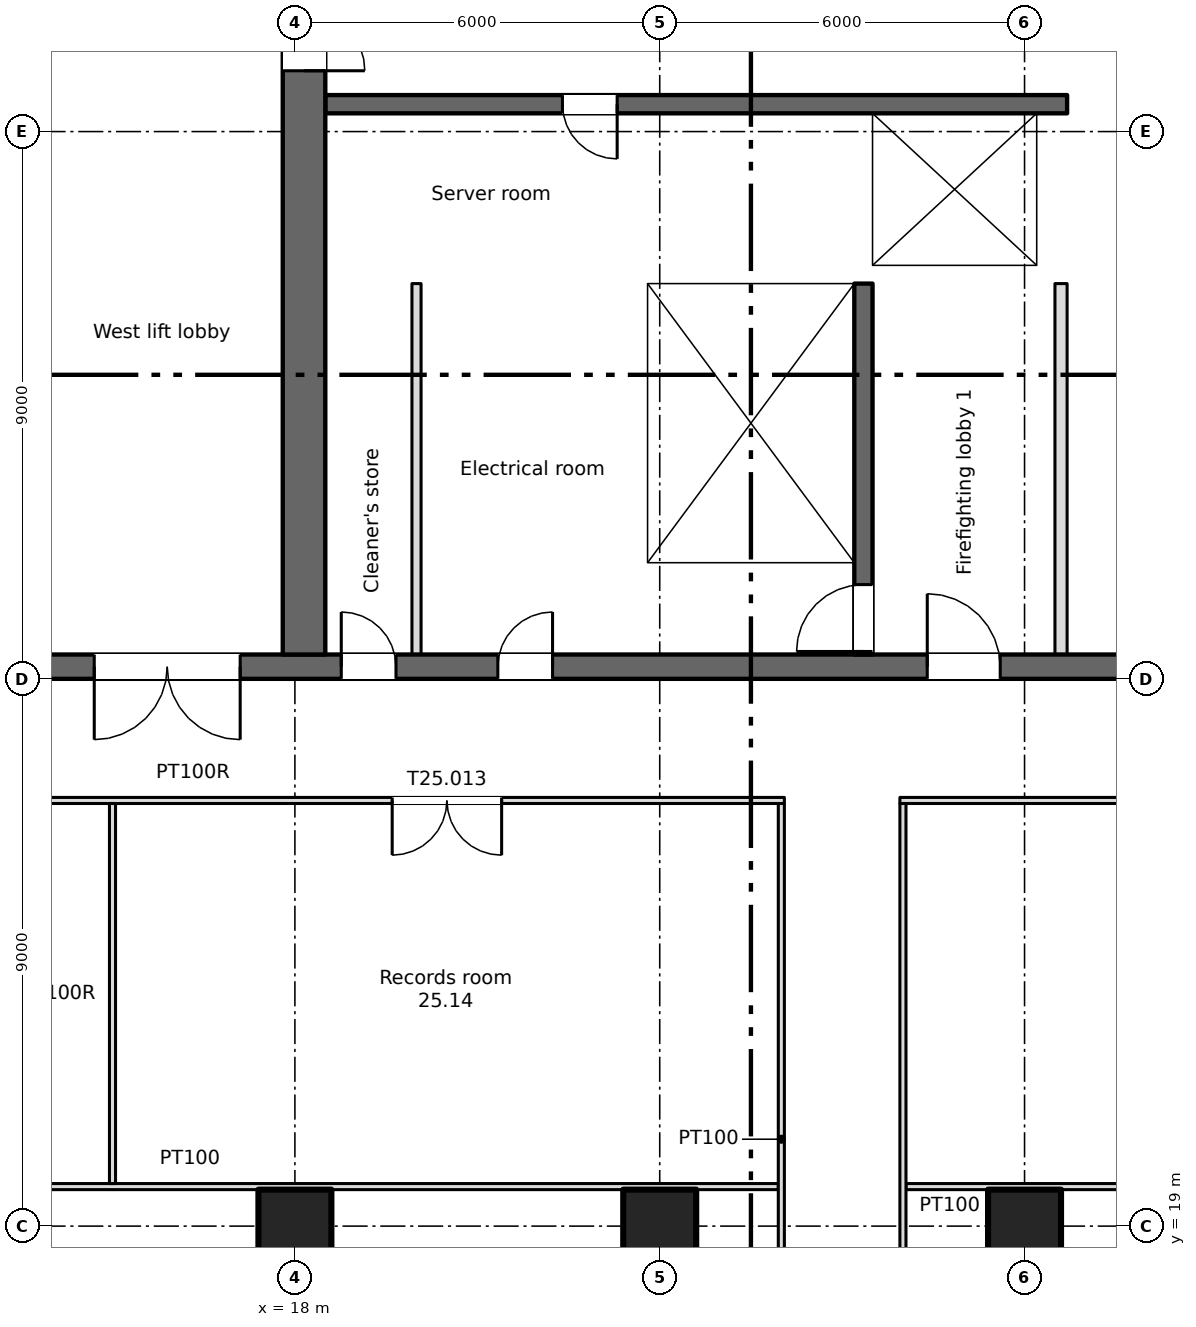
"""IFC4 building model, lengths in metres.
Left out: names, types, materials, properties, quantities, classifications, styles, units other than length and angle.
Written with IfcOpenShell. Run it as: python <this file> out.ifc"""

import sys

from ifc_helpers import new_model, si_unit, direction, frame, frame_2d, origin, origin_2d, place, context, subcontext, project, spatial, rectangle, extrude, element, fill, save


model = new_model("IFC4")
c1 = context("Model", 3, precision=1e-05, world=origin(), true_north=direction((0.0, 1.0)))
c2 = subcontext(c1, "Body", "Model", "MODEL_VIEW")
j1 = project(units=[si_unit("LENGTHUNIT", "METRE"), si_unit("PLANEANGLEUNIT", "RADIAN")], contexts=[c1])
p1 = place(None, origin())
s1 = spatial("IfcSite", under=j1, at=p1, CompositionType="ELEMENT")
p2 = place(p1, origin())
s2 = spatial("IfcBuilding", under=s1, at=p2, CompositionType="ELEMENT")
p3 = place(p2, frame((0.0, 0.0, 170.5)))
s3 = spatial("IfcBuildingStorey", under=s2, at=p3, CompositionType="ELEMENT", Elevation=170.5)
for number, where, z_axis, x_axis in (
    (1, (18.0, 19.0, 0.0), (0.0, 0.0, 1.0), (1.0, 0.0, 0.0)),
    (2, (24.0, 19.0, 0.0), (0.0, 0.0, 1.0), (1.0, 0.0, 0.0)),
    (3, (30.0, 19.0, 0.0), (0.0, 0.0, 1.0), (1.0, 0.0, 0.0)),
):
    element("IfcColumn", number, at=place(p3, frame(where, z_axis=z_axis, x_axis=x_axis)), inside=s3, PredefinedType="COLUMN", context=c2, shape_type="SweptSolid", body=[
        extrude(rectangle(XDim=1.2, YDim=1.2, at=origin_2d()), origin(), (0.0, 0.0, 1.0), 3.35),
    ])
p4 = place(p3, frame((6.6, 28.2, 0.0), z_axis=(0.0, 0.0, 1.0), x_axis=(1.0, 0.0, 0.0)))
e4 = element("IfcWall", 4, at=p4, inside=s3, PredefinedType="SHEAR", context=c2, shape_type="SweptSolid", body=[
    extrude(rectangle(XDim=57.9, YDim=0.4, at=frame_2d((28.95, 0.0))), origin(), (0.0, 0.0, 1.0), 3.35),
])
p5 = place(p4, frame((12.163, 0.0, 0.0)))
e5 = element("IfcOpeningElement", 5, at=p5, cuts=e4, PredefinedType="OPENING", context=c2, shape_type="SweptSolid", body=[
    extrude(rectangle(XDim=0.9, YDim=2.1, at=frame_2d((0.45, 1.05))), frame((0.0, 0.21, 0.0), z_axis=(0.0, -1.0, 0.0), x_axis=(1.0, 0.0, 0.0)), (0.0, 0.0, 1.0), 0.42),
])
p6 = place(p4, frame((14.738, 0.0, 0.0)))
e6 = element("IfcOpeningElement", 6, at=p6, cuts=e4, PredefinedType="OPENING", context=c2, shape_type="SweptSolid", body=[
    extrude(rectangle(XDim=0.9, YDim=2.1, at=frame_2d((0.45, 1.05))), frame((0.0, 0.21, 0.0), z_axis=(0.0, -1.0, 0.0), x_axis=(1.0, 0.0, 0.0)), (0.0, 0.0, 1.0), 0.42),
])
p7 = place(p4, frame((49.163, 0.0, 0.0)))
e7 = element("IfcOpeningElement", 7, at=p7, cuts=e4, PredefinedType="OPENING", context=c2, shape_type="SweptSolid", body=[
    extrude(rectangle(XDim=0.9, YDim=2.1, at=frame_2d((0.45, 1.05))), frame((0.0, 0.21, 0.0), z_axis=(0.0, -1.0, 0.0), x_axis=(1.0, 0.0, 0.0)), (0.0, 0.0, 1.0), 0.42),
])
p8 = place(p4, frame((51.738, 0.0, 0.0)))
e8 = element("IfcOpeningElement", 8, at=p8, cuts=e4, PredefinedType="OPENING", context=c2, shape_type="SweptSolid", body=[
    extrude(rectangle(XDim=0.9, YDim=2.1, at=frame_2d((0.45, 1.05))), frame((0.0, 0.21, 0.0), z_axis=(0.0, -1.0, 0.0), x_axis=(1.0, 0.0, 0.0)), (0.0, 0.0, 1.0), 0.42),
])
p9 = place(p4, frame((1.45, 0.0, 0.0)))
e9 = element("IfcOpeningElement", 9, at=p9, cuts=e4, PredefinedType="OPENING", context=c2, shape_type="SweptSolid", body=[
    extrude(rectangle(XDim=0.9, YDim=2.1, at=frame_2d((0.45, 1.05))), frame((0.0, 0.21, 0.0), z_axis=(0.0, -1.0, 0.0), x_axis=(1.0, 0.0, 0.0)), (0.0, 0.0, 1.0), 0.42),
])
p10 = place(p4, frame((4.8, 0.0, 0.0)))
e10 = element("IfcOpeningElement", 10, at=p10, cuts=e4, PredefinedType="OPENING", context=c2, shape_type="SweptSolid", body=[
    extrude(rectangle(XDim=1.2, YDim=2.1, at=frame_2d((0.6, 1.05))), frame((0.0, 0.21, 0.0), z_axis=(0.0, -1.0, 0.0), x_axis=(1.0, 0.0, 0.0)), (0.0, 0.0, 1.0), 0.42),
])
p11 = place(p4, frame((31.8, 0.0, 0.0)))
e11 = element("IfcOpeningElement", 11, at=p11, cuts=e4, PredefinedType="OPENING", context=c2, shape_type="SweptSolid", body=[
    extrude(rectangle(XDim=1.2, YDim=2.1, at=frame_2d((0.6, 1.05))), frame((0.0, 0.21, 0.0), z_axis=(0.0, -1.0, 0.0), x_axis=(1.0, 0.0, 0.0)), (0.0, 0.0, 1.0), 0.42),
])
p12 = place(p4, frame((55.3, 0.0, 0.0)))
e12 = element("IfcOpeningElement", 12, at=p12, cuts=e4, PredefinedType="OPENING", context=c2, shape_type="SweptSolid", body=[
    extrude(rectangle(XDim=1.2, YDim=2.1, at=frame_2d((0.6, 1.05))), frame((0.0, 0.21, 0.0), z_axis=(0.0, -1.0, 0.0), x_axis=(1.0, 0.0, 0.0)), (0.0, 0.0, 1.0), 0.42),
])
p13 = place(p4, frame((21.8, 0.0, 0.0)))
e13 = element("IfcOpeningElement", 13, at=p13, cuts=e4, PredefinedType="OPENING", context=c2, shape_type="SweptSolid", body=[
    extrude(rectangle(XDim=1.2, YDim=2.1, at=frame_2d((0.6, 1.05))), frame((0.0, 0.21, 0.0), z_axis=(0.0, -1.0, 0.0), x_axis=(1.0, 0.0, 0.0)), (0.0, 0.0, 1.0), 0.42),
])
p14 = place(p4, frame((41.8, 0.0, 0.0)))
e14 = element("IfcOpeningElement", 14, at=p14, cuts=e4, PredefinedType="OPENING", context=c2, shape_type="SweptSolid", body=[
    extrude(rectangle(XDim=1.2, YDim=2.1, at=frame_2d((0.6, 1.05))), frame((0.0, 0.21, 0.0), z_axis=(0.0, -1.0, 0.0), x_axis=(1.0, 0.0, 0.0)), (0.0, 0.0, 1.0), 0.42),
])
p15 = place(p4, frame((24.95, 0.0, 0.0)))
e15 = element("IfcOpeningElement", 15, at=p15, cuts=e4, PredefinedType="OPENING", context=c2, shape_type="SweptSolid", body=[
    extrude(rectangle(XDim=2.4, YDim=2.1, at=frame_2d((1.2, 1.05))), frame((0.0, 0.21, 0.0), z_axis=(0.0, -1.0, 0.0), x_axis=(1.0, 0.0, 0.0)), (0.0, 0.0, 1.0), 0.42),
])
p16 = place(p4, frame((37.45, 0.0, 0.0)))
e16 = element("IfcOpeningElement", 16, at=p16, cuts=e4, PredefinedType="OPENING", context=c2, shape_type="SweptSolid", body=[
    extrude(rectangle(XDim=2.4, YDim=2.1, at=frame_2d((1.2, 1.05))), frame((0.0, 0.21, 0.0), z_axis=(0.0, -1.0, 0.0), x_axis=(1.0, 0.0, 0.0)), (0.0, 0.0, 1.0), 0.42),
])
p17 = place(p4, frame((8.1, 0.0, 0.0)))
e17 = element("IfcOpeningElement", 17, at=p17, cuts=e4, PredefinedType="OPENING", context=c2, shape_type="SweptSolid", body=[
    extrude(rectangle(XDim=2.4, YDim=2.1, at=frame_2d((1.2, 1.05))), frame((0.0, 0.21, 0.0), z_axis=(0.0, -1.0, 0.0), x_axis=(1.0, 0.0, 0.0)), (0.0, 0.0, 1.0), 0.42),
])
p18 = place(p4, frame((28.95, 0.0, 0.0)))
e18 = element("IfcOpeningElement", 18, at=p18, cuts=e4, PredefinedType="OPENING", context=c2, shape_type="SweptSolid", body=[
    extrude(rectangle(XDim=0.9, YDim=2.1, at=frame_2d((0.45, 1.05))), frame((0.0, 0.21, 0.0), z_axis=(0.0, -1.0, 0.0), x_axis=(1.0, 0.0, 0.0)), (0.0, 0.0, 1.0), 0.42),
])
p19 = place(p4, frame((34.95, 0.0, 0.0)))
e19 = element("IfcOpeningElement", 19, at=p19, cuts=e4, PredefinedType="OPENING", context=c2, shape_type="SweptSolid", body=[
    extrude(rectangle(XDim=0.9, YDim=2.1, at=frame_2d((0.45, 1.05))), frame((0.0, 0.21, 0.0), z_axis=(0.0, -1.0, 0.0), x_axis=(1.0, 0.0, 0.0)), (0.0, 0.0, 1.0), 0.42),
])
p20 = place(p3, frame((18.15, 28.4, 0.0), z_axis=(0.0, 0.0, 1.0), x_axis=(0.0, 1.0, 0.0)))
e20 = element("IfcWall", 20, at=p20, inside=s3, PredefinedType="SHEAR", context=c2, shape_type="SweptSolid", body=[
    extrude(rectangle(XDim=16.9, YDim=0.7, at=frame_2d((8.45, 0.0))), origin(), (0.0, 0.0, 1.0), 3.35),
])
p21 = place(p20, frame((9.6, 0.0, 0.0)))
e21 = element("IfcOpeningElement", 21, at=p21, cuts=e20, PredefinedType="OPENING", context=c2, shape_type="SweptSolid", body=[
    extrude(rectangle(XDim=2.0, YDim=2.1, at=frame_2d((1.0, 1.05))), frame((0.0, 0.36, 0.0), z_axis=(0.0, -1.0, 0.0), x_axis=(1.0, 0.0, 0.0)), (0.0, 0.0, 1.0), 0.72),
])
p22 = place(p20, frame((15.4, 0.0, 0.0)))
e22 = element("IfcOpeningElement", 22, at=p22, cuts=e20, PredefinedType="OPENING", context=c2, shape_type="SweptSolid", body=[
    extrude(rectangle(XDim=1.2, YDim=2.1, at=frame_2d((0.6, 1.05))), frame((0.0, 0.36, 0.0), z_axis=(0.0, -1.0, 0.0), x_axis=(1.0, 0.0, 0.0)), (0.0, 0.0, 1.0), 0.72),
])
for number, where, z_axis, x_axis in (
    (23, (13.85, 28.4, 0.0), (0.0, 0.0, 1.0), (0.0, 1.0, 0.0)),
    (24, (23.65, 28.4, 0.0), (0.0, 0.0, 1.0), (0.0, 1.0, 0.0)),
):
    element("IfcWall", number, at=place(p3, frame(where, z_axis=z_axis, x_axis=x_axis)), inside=s3, PredefinedType="SHEAR", context=c2, shape_type="SweptSolid", body=[
        extrude(rectangle(XDim=6.1, YDim=0.3, at=frame_2d((3.05, 0.0))), origin(), (0.0, 0.0, 1.0), 3.35),
    ])
p23 = place(p3, frame((27.35, 28.4, 0.0), z_axis=(0.0, 0.0, 1.0), x_axis=(0.0, 1.0, 0.0)))
e25 = element("IfcWall", 25, at=p23, inside=s3, PredefinedType="SHEAR", context=c2, shape_type="SweptSolid", body=[
    extrude(rectangle(XDim=6.1, YDim=0.3, at=frame_2d((3.05, 0.0))), origin(), (0.0, 0.0, 1.0), 3.35),
])
p24 = place(p23, frame((0.05, 0.0, 0.0)))
e26 = element("IfcOpeningElement", 26, at=p24, cuts=e25, PredefinedType="OPENING", context=c2, shape_type="SweptSolid", body=[
    extrude(rectangle(XDim=1.1, YDim=2.1, at=frame_2d((0.55, 1.05))), frame((0.0, 0.16, 0.0), z_axis=(0.0, -1.0, 0.0), x_axis=(1.0, 0.0, 0.0)), (0.0, 0.0, 1.0), 0.32),
])
p25 = place(p3, frame((18.5, 34.65, 0.0), z_axis=(0.0, 0.0, 1.0), x_axis=(1.0, 0.0, 0.0)))
e27 = element("IfcWall", 27, at=p25, inside=s3, PredefinedType="SHEAR", context=c2, shape_type="SweptSolid", body=[
    extrude(rectangle(XDim=12.2, YDim=0.3, at=frame_2d((6.1, 0.0))), origin(), (0.0, 0.0, 1.0), 3.35),
])
p26 = place(p25, frame((9.8, 0.0, 0.0)))
e28 = element("IfcOpeningElement", 28, at=p26, cuts=e27, PredefinedType="OPENING", context=c2, shape_type="SweptSolid", body=[
    extrude(rectangle(XDim=1.1, YDim=2.1, at=frame_2d((0.55, 1.05))), frame((0.0, 0.16, 0.0), z_axis=(0.0, -1.0, 0.0), x_axis=(1.0, 0.0, 0.0)), (0.0, 0.0, 1.0), 0.32),
])
p27 = place(p3, frame((30.7, 37.45, 0.0), z_axis=(0.0, 0.0, 1.0), x_axis=(-1.0, 0.0, 0.0)))
e29 = element("IfcWall", 29, at=p27, inside=s3, PredefinedType="SHEAR", context=c2, shape_type="SweptSolid", body=[
    extrude(rectangle(XDim=12.2, YDim=0.3, at=frame_2d((6.1, 0.0))), origin(), (0.0, 0.0, 1.0), 3.35),
])
p28 = place(p27, frame((7.4, 0.0, 0.0)))
e30 = element("IfcOpeningElement", 30, at=p28, cuts=e29, PredefinedType="OPENING", context=c2, shape_type="SweptSolid", body=[
    extrude(rectangle(XDim=0.9, YDim=2.1, at=frame_2d((0.45, 1.05))), frame((0.0, 0.16, 0.0), z_axis=(0.0, -1.0, 0.0), x_axis=(1.0, 0.0, 0.0)), (0.0, 0.0, 1.0), 0.32),
])
p29 = place(p3, frame((27.35, 34.8, 0.0), z_axis=(0.0, 0.0, 1.0), x_axis=(0.0, 1.0, 0.0)))
e31 = element("IfcWall", 31, at=p29, inside=s3, PredefinedType="SHEAR", context=c2, shape_type="SweptSolid", body=[
    extrude(rectangle(XDim=2.5, YDim=0.3, at=frame_2d((1.25, 0.0))), origin(), (0.0, 0.0, 1.0), 3.35),
])
p30 = place(p3, frame((30.45, 34.8, 0.0), z_axis=(0.0, 0.0, 1.0), x_axis=(0.0, 1.0, 0.0)))
e32 = element("IfcWall", 32, at=p30, inside=s3, PredefinedType="SHEAR", context=c2, shape_type="SweptSolid", body=[
    extrude(rectangle(XDim=2.5, YDim=0.5, at=frame_2d((1.25, 0.0))), origin(), (0.0, 0.0, 1.0), 3.35),
])
p31 = place(p3, frame((13.85, 34.8, 0.0), z_axis=(0.0, 0.0, 1.0), x_axis=(0.0, 1.0, 0.0)))
e33 = element("IfcWall", 33, at=p31, inside=s3, PredefinedType="SHEAR", context=c2, shape_type="SweptSolid", body=[
    extrude(rectangle(XDim=2.5, YDim=0.3, at=frame_2d((1.25, 0.0))), origin(), (0.0, 0.0, 1.0), 3.35),
])
p32 = place(p3, frame((30.6, 28.4, 0.0), z_axis=(0.0, 0.0, 1.0), x_axis=(0.0, 1.0, 0.0)))
e34 = element("IfcWall", 34, at=p32, inside=s3, PredefinedType="PARTITIONING", context=c2, shape_type="SweptSolid", body=[
    extrude(rectangle(XDim=6.1, YDim=0.2, at=frame_2d((3.05, 0.0))), origin(), (0.0, 0.0, 1.0), 3.35),
])
p33 = place(p3, frame((20.0, 28.4, 0.0), z_axis=(0.0, 0.0, 1.0), x_axis=(0.0, 1.0, 0.0)))
e35 = element("IfcWall", 35, at=p33, inside=s3, PredefinedType="PARTITIONING", context=c2, shape_type="SweptSolid", body=[
    extrude(rectangle(XDim=6.1, YDim=0.15, at=frame_2d((3.05, 0.0))), origin(), (0.0, 0.0, 1.0), 3.35),
])
p34 = place(p3, frame((6.6, 19.65, 0.0), z_axis=(0.0, 0.0, 1.0), x_axis=(1.0, 0.0, 0.0)))
e36 = element("IfcWall", 36, at=p34, inside=s3, PredefinedType="PARTITIONING", context=c2, shape_type="SweptSolid", body=[
    extrude(rectangle(XDim=19.35, YDim=0.1, at=frame_2d((9.675, 0.0))), origin(), (0.0, 0.0, 1.0), 3.35),
])
p35 = place(p3, frame((28.05, 19.65, 0.0), z_axis=(0.0, 0.0, 1.0), x_axis=(1.0, 0.0, 0.0)))
e37 = element("IfcWall", 37, at=p35, inside=s3, PredefinedType="PARTITIONING", context=c2, shape_type="SweptSolid", body=[
    extrude(rectangle(XDim=21.9, YDim=0.1, at=frame_2d((10.95, 0.0))), origin(), (0.0, 0.0, 1.0), 3.35),
])
p36 = place(p3, frame((6.6, 26.0, 0.0), z_axis=(0.0, 0.0, 1.0), x_axis=(1.0, 0.0, 0.0)))
e38 = element("IfcWall", 38, at=p36, inside=s3, PredefinedType="PARTITIONING", context=c2, shape_type="SweptSolid", body=[
    extrude(rectangle(XDim=19.45, YDim=0.1, at=frame_2d((9.725, 0.0))), origin(), (0.0, 0.0, 1.0), 3.35),
])
p37 = place(p36, frame((3.7, 0.0, 0.0)))
e39 = element("IfcOpeningElement", 39, at=p37, cuts=e38, PredefinedType="OPENING", context=c2, shape_type="SweptSolid", body=[
    extrude(rectangle(XDim=1.0, YDim=2.1, at=frame_2d((0.5, 1.05))), frame((0.0, 0.06, 0.0), z_axis=(0.0, -1.0, 0.0), x_axis=(1.0, 0.0, 0.0)), (0.0, 0.0, 1.0), 0.12),
])
p38 = place(p36, frame((13.0, 0.0, 0.0)))
e40 = element("IfcOpeningElement", 40, at=p38, cuts=e38, PredefinedType="OPENING", context=c2, shape_type="SweptSolid", body=[
    extrude(rectangle(XDim=1.8, YDim=2.1, at=frame_2d((0.9, 1.05))), frame((0.0, 0.06, 0.0), z_axis=(0.0, -1.0, 0.0), x_axis=(1.0, 0.0, 0.0)), (0.0, 0.0, 1.0), 0.12),
])
p39 = place(p3, frame((27.95, 26.0, 0.0), z_axis=(0.0, 0.0, 1.0), x_axis=(1.0, 0.0, 0.0)))
e41 = element("IfcWall", 41, at=p39, inside=s3, PredefinedType="PARTITIONING", context=c2, shape_type="SweptSolid", body=[
    extrude(rectangle(XDim=22.1, YDim=0.1, at=frame_2d((11.05, 0.0))), origin(), (0.0, 0.0, 1.0), 3.35),
])
p40 = place(p39, frame((10.15, 0.0, 0.0)))
e42 = element("IfcOpeningElement", 42, at=p40, cuts=e41, PredefinedType="OPENING", context=c2, shape_type="SweptSolid", body=[
    extrude(rectangle(XDim=1.8, YDim=2.1, at=frame_2d((0.9, 1.05))), frame((0.0, 0.06, 0.0), z_axis=(0.0, -1.0, 0.0), x_axis=(1.0, 0.0, 0.0)), (0.0, 0.0, 1.0), 0.12),
])
p41 = place(p3, frame((15.0, 19.7, 0.0), z_axis=(0.0, 0.0, 1.0), x_axis=(0.0, 1.0, 0.0)))
e43 = element("IfcWall", 43, at=p41, inside=s3, PredefinedType="PARTITIONING", context=c2, shape_type="SweptSolid", body=[
    extrude(rectangle(XDim=6.25, YDim=0.1, at=frame_2d((3.125, 0.0))), origin(), (0.0, 0.0, 1.0), 3.35),
])
for number, where, z_axis, x_axis in (
    (44, (26.0, 12.7, 0.0), (0.0, 0.0, 1.0), (0.0, 1.0, 0.0)),
    (45, (28.0, 12.7, 0.0), (0.0, 0.0, 1.0), (0.0, 1.0, 0.0)),
):
    element("IfcWall", number, at=place(p3, frame(where, z_axis=z_axis, x_axis=x_axis)), inside=s3, PredefinedType="PARTITIONING", context=c2, shape_type="SweptSolid", body=[
        extrude(rectangle(XDim=13.25, YDim=0.1, at=frame_2d((6.625, 0.0))), origin(), (0.0, 0.0, 1.0), 3.35),
    ])
p42 = place(p5, origin())
e46 = element("IfcDoor", 46, at=p42, inside=s3, OperationType="SINGLE_SWING_LEFT", PredefinedType="DOOR", context=c2, shape_type="SweptSolid", body=[
    extrude(rectangle(XDim=0.9, YDim=2.1, at=frame_2d((0.45, 1.05))), frame((0.0, 0.025, 0.0), z_axis=(0.0, -1.0, 0.0), x_axis=(1.0, 0.0, 0.0)), (0.0, 0.0, 1.0), 0.05),
])
fill(e5, e46)
p43 = place(p6, origin())
e47 = element("IfcDoor", 47, at=p43, inside=s3, OperationType="SINGLE_SWING_RIGHT", PredefinedType="DOOR", context=c2, shape_type="SweptSolid", body=[
    extrude(rectangle(XDim=0.9, YDim=2.1, at=frame_2d((0.45, 1.05))), frame((0.0, 0.025, 0.0), z_axis=(0.0, -1.0, 0.0), x_axis=(1.0, 0.0, 0.0)), (0.0, 0.0, 1.0), 0.05),
])
fill(e6, e47)
p44 = place(p28, origin())
e48 = element("IfcDoor", 48, at=p44, inside=s3, OperationType="SINGLE_SWING_LEFT", PredefinedType="DOOR", context=c2, shape_type="SweptSolid", body=[
    extrude(rectangle(XDim=0.9, YDim=2.1, at=frame_2d((0.45, 1.05))), frame((0.0, 0.025, 0.0), z_axis=(0.0, -1.0, 0.0), x_axis=(1.0, 0.0, 0.0)), (0.0, 0.0, 1.0), 0.05),
])
fill(e30, e48)
p45 = place(p26, origin())
e49 = element("IfcDoor", 49, at=p45, inside=s3, OperationType="SLIDING_TO_LEFT", PredefinedType="DOOR", context=c2, shape_type="SweptSolid", body=[
    extrude(rectangle(XDim=1.1, YDim=2.1, at=frame_2d((0.55, 1.05))), frame((0.0, 0.025, 0.0), z_axis=(0.0, -1.0, 0.0), x_axis=(1.0, 0.0, 0.0)), (0.0, 0.0, 1.0), 0.05),
])
fill(e28, e49)
p46 = place(p24, origin())
e50 = element("IfcDoor", 50, at=p46, inside=s3, OperationType="SINGLE_SWING_LEFT", PredefinedType="DOOR", context=c2, shape_type="SweptSolid", body=[
    extrude(rectangle(XDim=1.1, YDim=2.1, at=frame_2d((0.55, 1.05))), frame((0.0, 0.025, 0.0), z_axis=(0.0, -1.0, 0.0), x_axis=(1.0, 0.0, 0.0)), (0.0, 0.0, 1.0), 0.05),
])
fill(e26, e50)
p47 = place(p13, origin())
e51 = element("IfcDoor", 51, at=p47, inside=s3, OperationType="SINGLE_SWING_LEFT", PredefinedType="DOOR", context=c2, shape_type="SweptSolid", body=[
    extrude(rectangle(XDim=1.2, YDim=2.1, at=frame_2d((0.6, 1.05))), frame((0.0, 0.025, 0.0), z_axis=(0.0, -1.0, 0.0), x_axis=(1.0, 0.0, 0.0)), (0.0, 0.0, 1.0), 0.05),
])
fill(e13, e51)
p48 = place(p17, origin())
e52 = element("IfcDoor", 52, at=p48, inside=s3, OperationType="DOUBLE_DOOR_SINGLE_SWING", PredefinedType="DOOR", context=c2, shape_type="SweptSolid", body=[
    extrude(rectangle(XDim=2.4, YDim=2.1, at=frame_2d((1.2, 1.05))), frame((0.0, 0.025, 0.0), z_axis=(0.0, -1.0, 0.0), x_axis=(1.0, 0.0, 0.0)), (0.0, 0.0, 1.0), 0.05),
])
fill(e17, e52)
p49 = place(p21, origin())
e53 = element("IfcDoor", 53, at=p49, inside=s3, OperationType="DOUBLE_DOOR_SINGLE_SWING", PredefinedType="DOOR", context=c2, shape_type="SweptSolid", body=[
    extrude(rectangle(XDim=2.0, YDim=2.1, at=frame_2d((1.0, 1.05))), frame((0.0, 0.025, 0.0), z_axis=(0.0, -1.0, 0.0), x_axis=(1.0, 0.0, 0.0)), (0.0, 0.0, 1.0), 0.05),
])
fill(e21, e53)
p50 = place(p38, origin())
e54 = element("IfcDoor", 54, at=p50, inside=s3, OperationType="DOUBLE_DOOR_SINGLE_SWING", PredefinedType="DOOR", context=c2, shape_type="SweptSolid", body=[
    extrude(rectangle(XDim=1.8, YDim=2.1, at=frame_2d((0.9, 1.05))), frame((0.0, 0.025, 0.0), z_axis=(0.0, -1.0, 0.0), x_axis=(1.0, 0.0, 0.0)), (0.0, 0.0, 1.0), 0.05),
])
fill(e40, e54)
save(model, sys.argv[1])
